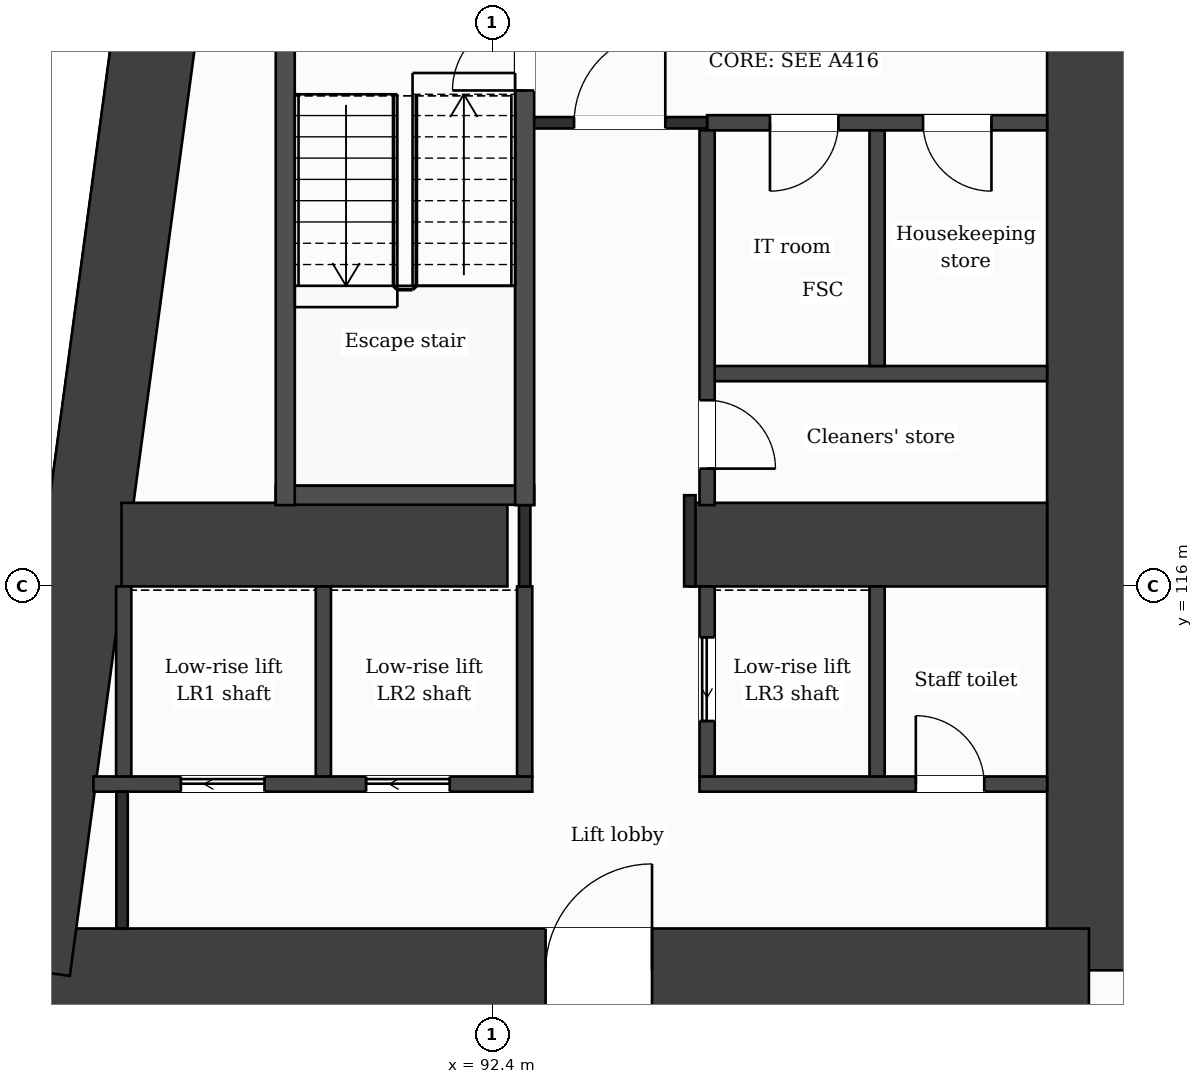
"""IFC4 building model, lengths in metres.
Left out: names, types, materials, properties, quantities, classifications, styles, units other than length and angle.
Written with IfcOpenShell. Run it as: python <this file> out.ifc"""

import sys

from ifc_helpers import new_model, si_unit, direction, frame, frame_2d, origin, place, context, subcontext, project, spatial, rectangle, extrude, element, fill, save


model = new_model("IFC4")
c1 = context("Model", 3, precision=1e-05, world=origin(), true_north=direction((0.0, 1.0)))
c2 = subcontext(c1, "Body", "Model", "MODEL_VIEW")
j1 = project(units=[si_unit("LENGTHUNIT", "METRE"), si_unit("PLANEANGLEUNIT", "RADIAN")], contexts=[c1])
p1 = place(None, origin())
s1 = spatial("IfcSite", under=j1, at=p1, CompositionType="ELEMENT")
p2 = place(p1, origin())
s2 = spatial("IfcBuilding", under=s1, at=p2, CompositionType="ELEMENT")
p3 = place(p2, frame((0.0, 0.0, 70.5)))
s3 = spatial("IfcBuildingStorey", under=s2, at=p3, CompositionType="ELEMENT", Elevation=70.5)
p4 = place(p3, frame((100.25, 131.85, 0.0), z_axis=(0.0, 0.0, 1.0), x_axis=(0.0, -1.0, 0.0)))
e1 = element("IfcWall", 1, at=p4, inside=s3, PredefinedType="SHEAR", context=c2, shape_type="SweptSolid", body=[
    extrude(rectangle(XDim=20.9, YDim=1.1, at=frame_2d((10.45, 0.0))), origin(), (0.0, 0.0, 1.0), 3.5),
])
p5 = place(p3, frame((100.25, 110.95, 0.0), z_axis=(0.0, 0.0, 1.0), x_axis=(-1.0, 0.0, 0.0)))
e2 = element("IfcWall", 2, at=p5, inside=s3, PredefinedType="SHEAR", context=c2, shape_type="SweptSolid", body=[
    extrude(rectangle(XDim=13.952, YDim=1.1, at=frame_2d((6.976, 0.0))), origin(), (0.0, 0.0, 1.0), 3.5),
])
p6 = place(p5, frame((5.748, 0.0, 0.0)))
e3 = element("IfcOpeningElement", 3, at=p6, cuts=e2, PredefinedType="OPENING", context=c2, shape_type="SweptSolid", body=[
    extrude(rectangle(XDim=1.4, YDim=2.1, at=frame_2d((0.7, 1.05))), frame((0.0, 0.56, 0.0), z_axis=(0.0, -1.0, 0.0), x_axis=(1.0, 0.0, 0.0)), (0.0, 0.0, 1.0), 1.12),
])
p7 = place(p3, frame((86.298, 110.95, 0.0), z_axis=(0.0, 0.0, 1.0), x_axis=(0.133400422634, 0.99106222168, 0.0)))
e4 = element("IfcWall", 4, at=p7, inside=s3, PredefinedType="SHEAR", context=c2, shape_type="SweptSolid", body=[
    extrude(rectangle(XDim=21.089, YDim=1.1, at=frame_2d((10.544, 0.0))), origin(), (0.0, 0.0, 1.0), 3.5),
])
p8 = place(p3, frame((87.523, 116.55, 0.0), z_axis=(0.0, 0.0, 1.0), x_axis=(1.0, 0.0, 0.0)))
e5 = element("IfcWall", 5, at=p8, inside=s3, PredefinedType="SHEAR", context=c2, shape_type="SweptSolid", body=[
    extrude(rectangle(XDim=5.077, YDim=1.1, at=frame_2d((2.539, 0.0))), origin(), (0.0, 0.0, 1.0), 3.5),
])
p9 = place(p3, frame((95.0, 116.55, 0.0), z_axis=(0.0, 0.0, 1.0), x_axis=(1.0, 0.0, 0.0)))
e6 = element("IfcWall", 6, at=p9, inside=s3, PredefinedType="SHEAR", context=c2, shape_type="SweptSolid", body=[
    extrude(rectangle(XDim=4.7, YDim=1.1, at=frame_2d((2.35, 0.0))), origin(), (0.0, 0.0, 1.0), 3.5),
])
p10 = place(p3, frame((87.153, 113.4, 0.0), z_axis=(0.0, 0.0, 1.0), x_axis=(1.0, 0.0, 0.0)))
e7 = element("IfcWall", 7, at=p10, inside=s3, PredefinedType="PARTITIONING", context=c2, shape_type="SweptSolid", body=[
    extrude(rectangle(XDim=5.774, YDim=0.2, at=frame_2d((2.887, 0.0))), origin(), (0.0, 0.0, 1.0), 3.18),
])
p11 = place(p10, frame((1.151, 0.0, 0.0)))
e8 = element("IfcOpeningElement", 8, at=p11, cuts=e7, PredefinedType="OPENING", context=c2, shape_type="SweptSolid", body=[
    extrude(rectangle(XDim=1.1, YDim=2.1, at=frame_2d((0.55, 1.05))), frame((0.0, 0.11, 0.0), z_axis=(0.0, -1.0, 0.0), x_axis=(1.0, 0.0, 0.0)), (0.0, 0.0, 1.0), 0.22),
])
p12 = place(p10, frame((3.588, 0.0, 0.0)))
e9 = element("IfcOpeningElement", 9, at=p12, cuts=e7, PredefinedType="OPENING", context=c2, shape_type="SweptSolid", body=[
    extrude(rectangle(XDim=1.1, YDim=2.1, at=frame_2d((0.55, 1.05))), frame((0.0, 0.11, 0.0), z_axis=(0.0, -1.0, 0.0), x_axis=(1.0, 0.0, 0.0)), (0.0, 0.0, 1.0), 0.22),
])
p13 = place(p3, frame((95.127, 113.4, 0.0), z_axis=(0.0, 0.0, 1.0), x_axis=(1.0, 0.0, 0.0)))
e10 = element("IfcWall", 10, at=p13, inside=s3, PredefinedType="PARTITIONING", context=c2, shape_type="SweptSolid", body=[
    extrude(rectangle(XDim=4.573, YDim=0.2, at=frame_2d((2.287, 0.0))), origin(), (0.0, 0.0, 1.0), 3.18),
])
p14 = place(p13, frame((2.846, 0.0, 0.0)))
e11 = element("IfcOpeningElement", 11, at=p14, cuts=e10, PredefinedType="OPENING", context=c2, shape_type="SweptSolid", body=[
    extrude(rectangle(XDim=0.9, YDim=2.1, at=frame_2d((0.45, 1.05))), frame((0.0, 0.11, 0.0), z_axis=(0.0, -1.0, 0.0), x_axis=(1.0, 0.0, 0.0)), (0.0, 0.0, 1.0), 0.22),
])
p15 = place(p3, frame((89.552, 117.2, 0.0), z_axis=(0.0, 0.0, 1.0), x_axis=(1.0, 0.0, 0.0)))
e12 = element("IfcWall", 12, at=p15, inside=s3, PredefinedType="PARTITIONING", context=c2, shape_type="SweptSolid", body=[
    extrude(rectangle(XDim=3.4, YDim=0.25, at=frame_2d((1.7, 0.0))), origin(), (0.0, 0.0, 1.0), 3.18),
])
p16 = place(p3, frame((95.227, 118.8, 0.0), z_axis=(0.0, 0.0, 1.0), x_axis=(1.0, 0.0, 0.0)))
e13 = element("IfcWall", 13, at=p16, inside=s3, PredefinedType="PARTITIONING", context=c2, shape_type="SweptSolid", body=[
    extrude(rectangle(XDim=4.473, YDim=0.2, at=frame_2d((2.236, 0.0))), origin(), (0.0, 0.0, 1.0), 3.18),
])
p17 = place(p3, frame((95.227, 122.1, 0.0), z_axis=(0.0, 0.0, 1.0), x_axis=(1.0, 0.0, 0.0)))
e14 = element("IfcWall", 14, at=p17, inside=s3, PredefinedType="PARTITIONING", context=c2, shape_type="SweptSolid", body=[
    extrude(rectangle(XDim=4.473, YDim=0.2, at=frame_2d((2.236, 0.0))), origin(), (0.0, 0.0, 1.0), 3.18),
])
p18 = place(p17, frame((0.827, 0.0, 0.0)))
e15 = element("IfcOpeningElement", 15, at=p18, cuts=e14, PredefinedType="OPENING", context=c2, shape_type="SweptSolid", body=[
    extrude(rectangle(XDim=0.9, YDim=2.1, at=frame_2d((0.45, 1.05))), frame((0.0, 0.11, 0.0), z_axis=(0.0, -1.0, 0.0), x_axis=(1.0, 0.0, 0.0)), (0.0, 0.0, 1.0), 0.22),
])
p19 = place(p17, frame((2.841, 0.0, 0.0)))
e16 = element("IfcOpeningElement", 16, at=p19, cuts=e14, PredefinedType="OPENING", context=c2, shape_type="SweptSolid", body=[
    extrude(rectangle(XDim=0.9, YDim=2.1, at=frame_2d((0.45, 1.05))), frame((0.0, 0.11, 0.0), z_axis=(0.0, -1.0, 0.0), x_axis=(1.0, 0.0, 0.0)), (0.0, 0.0, 1.0), 0.22),
])
p20 = place(p3, frame((92.827, 122.1, 0.0), z_axis=(0.0, 0.0, 1.0), x_axis=(1.0, 0.0, 0.0)))
e17 = element("IfcWall", 17, at=p20, inside=s3, PredefinedType="PARTITIONING", context=c2, shape_type="SweptSolid", body=[
    extrude(rectangle(XDim=2.4, YDim=0.15, at=frame_2d((1.2, 0.0))), origin(), (0.0, 0.0, 1.0), 3.18),
])
p21 = place(p20, frame((0.65, 0.0, 0.0)))
e18 = element("IfcOpeningElement", 18, at=p21, cuts=e17, PredefinedType="OPENING", context=c2, shape_type="SweptSolid", body=[
    extrude(rectangle(XDim=1.2, YDim=2.1, at=frame_2d((0.6, 1.05))), frame((0.0, 0.085, 0.0), z_axis=(0.0, -1.0, 0.0), x_axis=(1.0, 0.0, 0.0)), (0.0, 0.0, 1.0), 0.17),
])
p22 = place(p3, frame((87.552, 113.5, 0.0), z_axis=(0.0, 0.0, 1.0), x_axis=(0.0, 1.0, 0.0)))
e19 = element("IfcWall", 19, at=p22, inside=s3, PredefinedType="PARTITIONING", context=c2, shape_type="SweptSolid", body=[
    extrude(rectangle(XDim=2.5, YDim=0.2, at=frame_2d((1.25, 0.0))), origin(), (0.0, 0.0, 1.0), 3.18),
])
p23 = place(p3, frame((87.53, 111.5, 0.0), z_axis=(0.0, 0.0, 1.0), x_axis=(0.0, 1.0, 0.0)))
e20 = element("IfcWall", 20, at=p23, inside=s3, PredefinedType="PARTITIONING", context=c2, shape_type="SweptSolid", body=[
    extrude(rectangle(XDim=1.8, YDim=0.15, at=frame_2d((0.9, 0.0))), origin(), (0.0, 0.0, 1.0), 3.18),
])
p24 = place(p3, frame((89.677, 117.07, 0.0), z_axis=(0.0, 0.0, 1.0), x_axis=(0.0, 1.0, 0.0)))
e21 = element("IfcWall", 21, at=p24, inside=s3, PredefinedType="PARTITIONING", context=c2, shape_type="SweptSolid", body=[
    extrude(rectangle(XDim=6.755, YDim=0.25, at=frame_2d((3.377, 0.0))), origin(), (0.0, 0.0, 1.0), 3.18),
])
for number, where, z_axis, x_axis in (
    (22, (90.178, 113.5, 0.0), (0.0, 0.0, 1.0), (0.0, 1.0, 0.0)),
    (23, (92.827, 113.5, 0.0), (0.0, 0.0, 1.0), (0.0, 1.0, 0.0)),
):
    element("IfcWall", number, at=place(p3, frame(where, z_axis=z_axis, x_axis=x_axis)), inside=s3, PredefinedType="PARTITIONING", context=c2, shape_type="SweptSolid", body=[
        extrude(rectangle(XDim=2.5, YDim=0.2, at=frame_2d((1.25, 0.0))), origin(), (0.0, 0.0, 1.0), 3.18),
    ])
p25 = place(p3, frame((92.827, 116.0, 0.0), z_axis=(0.0, 0.0, 1.0), x_axis=(0.0, 1.0, 0.0)))
e24 = element("IfcWall", 24, at=p25, inside=s3, PredefinedType="PARTITIONING", context=c2, shape_type="SweptSolid", body=[
    extrude(rectangle(XDim=1.07, YDim=0.15, at=frame_2d((0.535, 0.0))), origin(), (0.0, 0.0, 1.0), 3.18),
])
p26 = place(p3, frame((92.827, 117.07, 0.0), z_axis=(0.0, 0.0, 1.0), x_axis=(0.0, 1.0, 0.0)))
e25 = element("IfcWall", 25, at=p26, inside=s3, PredefinedType="PARTITIONING", context=c2, shape_type="SweptSolid", body=[
    extrude(rectangle(XDim=6.755, YDim=0.25, at=frame_2d((3.377, 0.0))), origin(), (0.0, 0.0, 1.0), 3.18),
])
p27 = place(p26, frame((5.455, 0.0, 0.0)))
e26 = element("IfcOpeningElement", 26, at=p27, cuts=e25, PredefinedType="OPENING", context=c2, shape_type="SweptSolid", body=[
    extrude(rectangle(XDim=0.95, YDim=2.1, at=frame_2d((0.475, 1.05))), frame((0.0, 0.135, 0.0), z_axis=(0.0, -1.0, 0.0), x_axis=(1.0, 0.0, 0.0)), (0.0, 0.0, 1.0), 0.27),
])
p28 = place(p3, frame((95.0, 116.0, 0.0), z_axis=(0.0, 0.0, 1.0), x_axis=(0.0, 1.0, 0.0)))
e27 = element("IfcWall", 27, at=p28, inside=s3, PredefinedType="PARTITIONING", context=c2, shape_type="SweptSolid", body=[
    extrude(rectangle(XDim=1.2, YDim=0.15, at=frame_2d((0.6, 0.0))), origin(), (0.0, 0.0, 1.0), 3.18),
])
p29 = place(p3, frame((95.227, 113.5, 0.0), z_axis=(0.0, 0.0, 1.0), x_axis=(0.0, 1.0, 0.0)))
e28 = element("IfcWall", 28, at=p29, inside=s3, PredefinedType="PARTITIONING", context=c2, shape_type="SweptSolid", body=[
    extrude(rectangle(XDim=2.5, YDim=0.2, at=frame_2d((1.25, 0.0))), origin(), (0.0, 0.0, 1.0), 3.18),
])
p30 = place(p29, frame((0.73, 0.0, 0.0)))
e29 = element("IfcOpeningElement", 29, at=p30, cuts=e28, PredefinedType="OPENING", context=c2, shape_type="SweptSolid", body=[
    extrude(rectangle(XDim=1.1, YDim=2.1, at=frame_2d((0.55, 1.05))), frame((0.0, 0.11, 0.0), z_axis=(0.0, -1.0, 0.0), x_axis=(1.0, 0.0, 0.0)), (0.0, 0.0, 1.0), 0.22),
])
p31 = place(p3, frame((95.227, 117.07, 0.0), z_axis=(0.0, 0.0, 1.0), x_axis=(0.0, 1.0, 0.0)))
e30 = element("IfcWall", 30, at=p31, inside=s3, PredefinedType="PARTITIONING", context=c2, shape_type="SweptSolid", body=[
    extrude(rectangle(XDim=4.93, YDim=0.2, at=frame_2d((2.465, 0.0))), origin(), (0.0, 0.0, 1.0), 3.18),
])
p32 = place(p31, frame((0.48, 0.0, 0.0)))
e31 = element("IfcOpeningElement", 31, at=p32, cuts=e30, PredefinedType="OPENING", context=c2, shape_type="SweptSolid", body=[
    extrude(rectangle(XDim=0.9, YDim=2.1, at=frame_2d((0.45, 1.05))), frame((0.0, 0.11, 0.0), z_axis=(0.0, -1.0, 0.0), x_axis=(1.0, 0.0, 0.0)), (0.0, 0.0, 1.0), 0.22),
])
p33 = place(p3, frame((97.463, 113.5, 0.0), z_axis=(0.0, 0.0, 1.0), x_axis=(0.0, 1.0, 0.0)))
e32 = element("IfcWall", 32, at=p33, inside=s3, PredefinedType="PARTITIONING", context=c2, shape_type="SweptSolid", body=[
    extrude(rectangle(XDim=2.5, YDim=0.2, at=frame_2d((1.25, 0.0))), origin(), (0.0, 0.0, 1.0), 3.18),
])
p34 = place(p3, frame((97.463, 118.9, 0.0), z_axis=(0.0, 0.0, 1.0), x_axis=(0.0, 1.0, 0.0)))
e33 = element("IfcWall", 33, at=p34, inside=s3, PredefinedType="PARTITIONING", context=c2, shape_type="SweptSolid", body=[
    extrude(rectangle(XDim=3.1, YDim=0.2, at=frame_2d((1.55, 0.0))), origin(), (0.0, 0.0, 1.0), 3.18),
])
p35 = place(p21, origin())
e34 = element("IfcDoor", 34, at=p35, inside=s3, OperationType="SINGLE_SWING_RIGHT", PredefinedType="DOOR", context=c2, shape_type="SweptSolid", body=[
    extrude(rectangle(XDim=1.2, YDim=2.1, at=frame_2d((0.6, 1.05))), frame((0.0, 0.025, 0.0), z_axis=(0.0, -1.0, 0.0), x_axis=(1.0, 0.0, 0.0)), (0.0, 0.0, 1.0), 0.05),
])
fill(e18, e34)
p36 = place(p18, origin())
e35 = element("IfcDoor", 35, at=p36, inside=s3, OperationType="SINGLE_SWING_LEFT", PredefinedType="DOOR", context=c2, shape_type="SweptSolid", body=[
    extrude(rectangle(XDim=0.9, YDim=2.1, at=frame_2d((0.45, 1.05))), frame((0.0, 0.025, 0.0), z_axis=(0.0, -1.0, 0.0), x_axis=(1.0, 0.0, 0.0)), (0.0, 0.0, 1.0), 0.05),
])
fill(e15, e35)
p37 = place(p19, origin())
e36 = element("IfcDoor", 36, at=p37, inside=s3, OperationType="SINGLE_SWING_RIGHT", PredefinedType="DOOR", context=c2, shape_type="SweptSolid", body=[
    extrude(rectangle(XDim=0.9, YDim=2.1, at=frame_2d((0.45, 1.05))), frame((0.0, 0.025, 0.0), z_axis=(0.0, -1.0, 0.0), x_axis=(1.0, 0.0, 0.0)), (0.0, 0.0, 1.0), 0.05),
])
fill(e16, e36)
p38 = place(p27, origin())
e37 = element("IfcDoor", 37, at=p38, inside=s3, OperationType="SINGLE_SWING_LEFT", PredefinedType="DOOR", context=c2, shape_type="SweptSolid", body=[
    extrude(rectangle(XDim=0.95, YDim=2.1, at=frame_2d((0.475, 1.05))), frame((0.0, 0.025, 0.0), z_axis=(0.0, -1.0, 0.0), x_axis=(1.0, 0.0, 0.0)), (0.0, 0.0, 1.0), 0.05),
])
fill(e26, e37)
p39 = place(p32, origin())
e38 = element("IfcDoor", 38, at=p39, inside=s3, OperationType="SINGLE_SWING_LEFT", PredefinedType="DOOR", context=c2, shape_type="SweptSolid", body=[
    extrude(rectangle(XDim=0.9, YDim=2.1, at=frame_2d((0.45, 1.05))), frame((0.0, 0.025, 0.0), z_axis=(0.0, -1.0, 0.0), x_axis=(1.0, 0.0, 0.0)), (0.0, 0.0, 1.0), 0.05),
])
fill(e31, e38)
p40 = place(p11, origin())
e39 = element("IfcDoor", 39, at=p40, inside=s3, OperationType="SLIDING_TO_LEFT", PredefinedType="DOOR", context=c2, shape_type="SweptSolid", body=[
    extrude(rectangle(XDim=1.1, YDim=2.1, at=frame_2d((0.55, 1.05))), frame((0.0, 0.025, 0.0), z_axis=(0.0, -1.0, 0.0), x_axis=(1.0, 0.0, 0.0)), (0.0, 0.0, 1.0), 0.05),
])
fill(e8, e39)
p41 = place(p12, origin())
e40 = element("IfcDoor", 40, at=p41, inside=s3, OperationType="SLIDING_TO_LEFT", PredefinedType="DOOR", context=c2, shape_type="SweptSolid", body=[
    extrude(rectangle(XDim=1.1, YDim=2.1, at=frame_2d((0.55, 1.05))), frame((0.0, 0.025, 0.0), z_axis=(0.0, -1.0, 0.0), x_axis=(1.0, 0.0, 0.0)), (0.0, 0.0, 1.0), 0.05),
])
fill(e9, e40)
p42 = place(p30, origin())
e41 = element("IfcDoor", 41, at=p42, inside=s3, OperationType="SLIDING_TO_LEFT", PredefinedType="DOOR", context=c2, shape_type="SweptSolid", body=[
    extrude(rectangle(XDim=1.1, YDim=2.1, at=frame_2d((0.55, 1.05))), frame((0.0, 0.025, 0.0), z_axis=(0.0, -1.0, 0.0), x_axis=(1.0, 0.0, 0.0)), (0.0, 0.0, 1.0), 0.05),
])
fill(e29, e41)
p43 = place(p14, origin())
e42 = element("IfcDoor", 42, at=p43, inside=s3, OperationType="SINGLE_SWING_LEFT", PredefinedType="DOOR", context=c2, shape_type="SweptSolid", body=[
    extrude(rectangle(XDim=0.9, YDim=2.1, at=frame_2d((0.45, 1.05))), frame((0.0, 0.025, 0.0), z_axis=(0.0, -1.0, 0.0), x_axis=(1.0, 0.0, 0.0)), (0.0, 0.0, 1.0), 0.05),
])
fill(e11, e42)
p44 = place(p6, origin())
e43 = element("IfcDoor", 43, at=p44, inside=s3, OperationType="SINGLE_SWING_LEFT", PredefinedType="DOOR", context=c2, shape_type="SweptSolid", body=[
    extrude(rectangle(XDim=1.4, YDim=2.1, at=frame_2d((0.7, 1.05))), frame((0.0, 0.025, 0.0), z_axis=(0.0, -1.0, 0.0), x_axis=(1.0, 0.0, 0.0)), (0.0, 0.0, 1.0), 0.05),
])
fill(e3, e43)
save(model, sys.argv[1])
